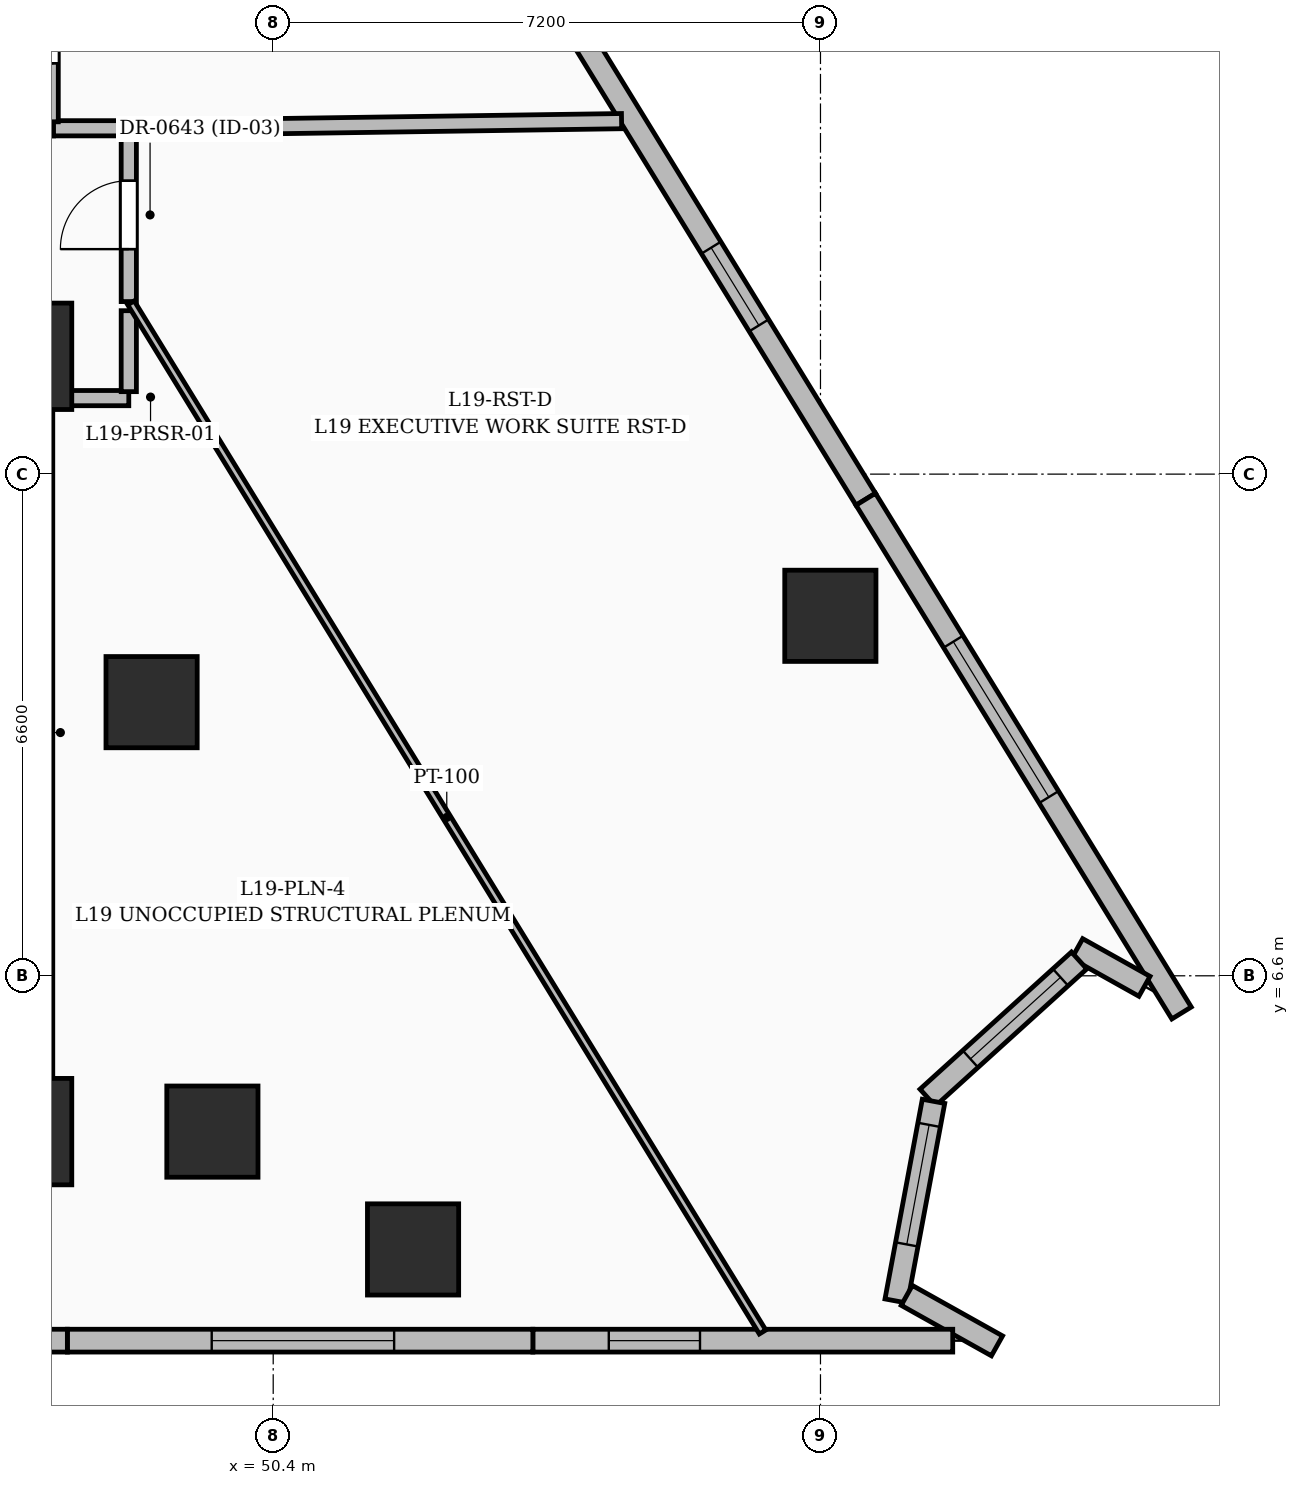
"""IFC4 building model, lengths in metres.
Left out: names, types, materials, properties, quantities, classifications, styles, units other than length and angle.
Written with IfcOpenShell. Run it as: python <this file> out.ifc"""

import sys

from ifc_helpers import new_model, si_unit, direction, frame, frame_2d, origin, origin_2d, place, context, subcontext, project, spatial, rectangle, extrude, element, fill, save


model = new_model("IFC4")
c1 = context("Model", 3, precision=1e-05, world=origin(), true_north=direction((0.0, 1.0)))
c2 = subcontext(c1, "Body", "Model", "MODEL_VIEW")
j1 = project(units=[si_unit("LENGTHUNIT", "METRE"), si_unit("PLANEANGLEUNIT", "RADIAN")], contexts=[c1])
p1 = place(None, origin())
s1 = spatial("IfcSite", under=j1, at=p1, CompositionType="ELEMENT")
p2 = place(p1, origin())
s2 = spatial("IfcBuilding", under=s1, at=p2, CompositionType="ELEMENT")
p3 = place(p2, frame((0.0, 0.0, 78.6)))
s3 = spatial("IfcBuildingStorey", under=s2, at=p3, CompositionType="ELEMENT", Elevation=78.6)
for number, where, z_axis, x_axis in (
    (1, (47.05, 4.55, 0.0), (0.0, 0.0, 1.0), (1.0, 0.0, 0.0)),
    (2, (47.05, 14.75, 0.0), (0.0, 0.0, 1.0), (1.0, 0.0, 0.0)),
):
    element("IfcColumn", number, at=place(p3, frame(where, z_axis=z_axis, x_axis=x_axis)), inside=s3, PredefinedType="COLUMN", context=c2, shape_type="SweptSolid", body=[
        extrude(rectangle(XDim=1.4, YDim=1.4, at=origin_2d()), origin(), (0.0, 0.0, 1.0), 3.6),
    ])
for number, where, z_axis, x_axis in (
    (3, (49.6, 4.55, 0.0), (0.0, 0.0, 1.0), (1.0, 0.0, 0.0)),
    (4, (48.8, 10.2, 0.0), (0.0, 0.0, 1.0), (1.0, 0.0, 0.0)),
    (5, (52.24, 3.0, 0.0), (0.0, 0.0, 1.0), (1.0, 0.0, 0.0)),
    (6, (57.73, 11.336, 0.0), (0.0, 0.0, 1.0), (1.0, 0.0, 0.0)),
):
    element("IfcColumn", number, at=place(p3, frame(where, z_axis=z_axis, x_axis=x_axis)), inside=s3, PredefinedType="COLUMN", context=c2, shape_type="SweptSolid", body=[
        extrude(rectangle(XDim=1.2, YDim=1.2, at=origin_2d()), origin(), (0.0, 0.0, 1.0), 3.6),
    ])
p4 = place(p3, frame((54.041, 19.629, 0.0), z_axis=(0.0, 0.0, 1.0), x_axis=(0.523661280051, -0.851926560083, 0.0)))
e7 = element("IfcWall", 7, at=p4, inside=s3, PredefinedType="SOLIDWALL", context=c2, shape_type="SweptSolid", body=[
    extrude(rectangle(XDim=7.934, YDim=0.3, at=frame_2d((3.967, 0.0))), origin(), (0.0, 0.0, 1.0), 3.35),
])
p5 = place(p4, frame((4.05, 0.0, 0.8)))
e8 = element("IfcOpeningElement", 8, at=p5, cuts=e7, PredefinedType="OPENING", context=c2, shape_type="SweptSolid", body=[
    extrude(rectangle(XDim=1.2, YDim=1.8, at=frame_2d((0.6, 0.9))), frame((0.0, 0.16, 0.0), z_axis=(0.0, -1.0, 0.0), x_axis=(1.0, 0.0, 0.0)), (0.0, 0.0, 1.0), 0.32),
])
p6 = place(p3, frame((58.195, 12.87, 0.0), z_axis=(0.0, 0.0, 1.0), x_axis=(0.52368361247, -0.851912832413, 0.0)))
e9 = element("IfcWall", 9, at=p6, inside=s3, PredefinedType="SOLIDWALL", context=c2, shape_type="SweptSolid", body=[
    extrude(rectangle(XDim=7.934, YDim=0.3, at=frame_2d((3.967, 0.0))), origin(), (0.0, 0.0, 1.0), 3.35),
])
p7 = place(p6, frame((2.2, 0.0, 0.6)))
e10 = element("IfcOpeningElement", 10, at=p7, cuts=e9, PredefinedType="OPENING", context=c2, shape_type="SweptSolid", body=[
    extrude(rectangle(XDim=2.4, YDim=2.1, at=frame_2d((1.2, 1.05))), frame((0.0, 0.16, 0.0), z_axis=(0.0, -1.0, 0.0), x_axis=(1.0, 0.0, 0.0)), (0.0, 0.0, 1.0), 0.32),
])
p8 = place(p3, frame((61.863, 6.462, 0.0), z_axis=(0.0, 0.0, 1.0), x_axis=(-0.872678236231, 0.488295705499, 0.0)))
e11 = element("IfcWall", 11, at=p8, inside=s3, PredefinedType="SOLIDWALL", context=c2, shape_type="SweptSolid", body=[
    extrude(rectangle(XDim=1.015, YDim=0.3, at=frame_2d((0.507, 0.0))), origin(), (0.0, 0.0, 1.0), 3.35),
])
p9 = place(p3, frame((61.003, 6.802, 0.0), z_axis=(0.0, 0.0, 1.0), x_axis=(-0.741163448221, -0.671324618215, 0.0)))
e12 = element("IfcWall", 12, at=p9, inside=s3, PredefinedType="SOLIDWALL", context=c2, shape_type="SweptSolid", body=[
    extrude(rectangle(XDim=2.688, YDim=0.3, at=frame_2d((1.344, 0.0))), origin(), (0.0, 0.0, 1.0), 3.35),
])
p10 = place(p9, frame((0.33, 0.0, 0.55)))
e13 = element("IfcOpeningElement", 13, at=p10, cuts=e12, PredefinedType="OPENING", context=c2, shape_type="SweptSolid", body=[
    extrude(rectangle(XDim=1.6, YDim=2.2, at=frame_2d((0.8, 1.1))), frame((0.0, 0.16, 0.0), z_axis=(0.0, -1.0, 0.0), x_axis=(1.0, 0.0, 0.0)), (0.0, 0.0, 1.0), 0.32),
])
p11 = place(p3, frame((59.087, 4.948, 0.0), z_axis=(0.0, 0.0, 1.0), x_axis=(-0.183786629236, -0.982966161632, 0.0)))
e14 = element("IfcWall", 14, at=p11, inside=s3, PredefinedType="SOLIDWALL", context=c2, shape_type="SweptSolid", body=[
    extrude(rectangle(XDim=2.673, YDim=0.3, at=frame_2d((1.336, 0.0))), origin(), (0.0, 0.0, 1.0), 3.35),
])
p12 = place(p11, frame((0.315, 0.0, 0.55)))
e15 = element("IfcOpeningElement", 15, at=p12, cuts=e14, PredefinedType="OPENING", context=c2, shape_type="SweptSolid", body=[
    extrude(rectangle(XDim=1.6, YDim=2.2, at=frame_2d((0.8, 1.1))), frame((0.0, 0.16, 0.0), z_axis=(0.0, -1.0, 0.0), x_axis=(1.0, 0.0, 0.0)), (0.0, 0.0, 1.0), 0.32),
])
p13 = place(p3, frame((58.735, 2.396, 0.0), z_axis=(0.0, 0.0, 1.0), x_axis=(0.872747775204, -0.488171405221, 0.0)))
e16 = element("IfcWall", 16, at=p13, inside=s3, PredefinedType="SOLIDWALL", context=c2, shape_type="SweptSolid", body=[
    extrude(rectangle(XDim=1.36, YDim=0.3, at=frame_2d((0.68, 0.0))), origin(), (0.0, 0.0, 1.0), 3.35),
])
p14 = place(p3, frame((59.34, 1.8, 0.0), z_axis=(0.0, 0.0, 1.0), x_axis=(-1.0, 0.0, 0.0)))
e17 = element("IfcWall", 17, at=p14, inside=s3, PredefinedType="SOLIDWALL", context=c2, shape_type="SweptSolid", body=[
    extrude(rectangle(XDim=5.524, YDim=0.3, at=frame_2d((2.762, 0.0))), origin(), (0.0, 0.0, 1.0), 3.35),
])
p15 = place(p14, frame((3.325, 0.0, 0.8)))
e18 = element("IfcOpeningElement", 18, at=p15, cuts=e17, PredefinedType="OPENING", context=c2, shape_type="SweptSolid", body=[
    extrude(rectangle(XDim=1.2, YDim=1.8, at=frame_2d((0.6, 0.9))), frame((0.0, 0.16, 0.0), z_axis=(0.0, -1.0, 0.0), x_axis=(1.0, 0.0, 0.0)), (0.0, 0.0, 1.0), 0.32),
])
p16 = place(p3, frame((53.816, 1.8, 0.0), z_axis=(0.0, 0.0, 1.0), x_axis=(-1.0, 0.0, 0.0)))
e19 = element("IfcWall", 19, at=p16, inside=s3, PredefinedType="SOLIDWALL", context=c2, shape_type="SweptSolid", body=[
    extrude(rectangle(XDim=6.124, YDim=0.3, at=frame_2d((3.062, 0.0))), origin(), (0.0, 0.0, 1.0), 3.35),
])
p17 = place(p16, frame((1.825, 0.0, 0.6)))
e20 = element("IfcOpeningElement", 20, at=p17, cuts=e19, PredefinedType="OPENING", context=c2, shape_type="SweptSolid", body=[
    extrude(rectangle(XDim=2.4, YDim=2.1, at=frame_2d((1.2, 1.05))), frame((0.0, 0.16, 0.0), z_axis=(0.0, -1.0, 0.0), x_axis=(1.0, 0.0, 0.0)), (0.0, 0.0, 1.0), 0.32),
])
p18 = place(p3, frame((47.692, 1.8, 0.0), z_axis=(0.0, 0.0, 1.0), x_axis=(-1.0, 0.0, 0.0)))
e21 = element("IfcWall", 21, at=p18, inside=s3, PredefinedType="SOLIDWALL", context=c2, shape_type="SweptSolid", body=[
    extrude(rectangle(XDim=6.124, YDim=0.3, at=frame_2d((3.062, 0.0))), origin(), (0.0, 0.0, 1.0), 3.35),
])
p19 = place(p18, frame((1.975, 0.0, 0.55)))
e22 = element("IfcOpeningElement", 22, at=p19, cuts=e21, PredefinedType="OPENING", context=c2, shape_type="SweptSolid", body=[
    extrude(rectangle(XDim=2.1, YDim=2.4, at=frame_2d((1.05, 1.2))), frame((0.0, 0.16, 0.0), z_axis=(0.0, -1.0, 0.0), x_axis=(1.0, 0.0, 0.0)), (0.0, 0.0, 1.0), 0.32),
])
p20 = place(p3, frame((47.5, 14.2, 0.0), z_axis=(0.0, 0.0, 1.0), x_axis=(1.0, 0.0, 0.0)))
e23 = element("IfcWall", 23, at=p20, inside=s3, PredefinedType="PARTITIONING", context=c2, shape_type="SweptSolid", body=[
    extrude(rectangle(XDim=1.0, YDim=0.2, at=frame_2d((0.5, 0.0))), origin(), (0.0, 0.0, 1.0), 3.35),
])
p21 = place(p3, frame((48.5, 14.285, 0.0), z_axis=(0.0, 0.0, 1.0), x_axis=(0.0, 1.0, 0.0)))
e24 = element("IfcWall", 24, at=p21, inside=s3, PredefinedType="PARTITIONING", context=c2, shape_type="SweptSolid", body=[
    extrude(rectangle(XDim=1.065, YDim=0.2, at=frame_2d((0.533, 0.0))), origin(), (0.0, 0.0, 1.0), 3.35),
])
p22 = place(p3, frame((48.5, 15.47, 0.0), z_axis=(0.0, 0.0, 1.0), x_axis=(0.0, 1.0, 0.0)))
e25 = element("IfcWall", 25, at=p22, inside=s3, PredefinedType="PARTITIONING", context=c2, shape_type="SweptSolid", body=[
    extrude(rectangle(XDim=2.28, YDim=0.2, at=frame_2d((1.14, 0.0))), origin(), (0.0, 0.0, 1.0), 2.345),
])
p23 = place(p22, frame((0.69, 0.0, 0.0)))
e26 = element("IfcOpeningElement", 26, at=p23, cuts=e25, PredefinedType="OPENING", context=c2, shape_type="SweptSolid", body=[
    extrude(rectangle(XDim=0.9, YDim=2.1, at=frame_2d((0.45, 1.05))), frame((0.0, 0.11, 0.0), z_axis=(0.0, -1.0, 0.0), x_axis=(1.0, 0.0, 0.0)), (0.0, 0.0, 1.0), 0.22),
])
p24 = place(p3, frame((47.51, 17.75, 0.0), z_axis=(0.0, 0.0, 1.0), x_axis=(-1.0, 0.0, 0.0)))
e27 = element("IfcWall", 27, at=p24, inside=s3, PredefinedType="PARTITIONING", context=c2, shape_type="SweptSolid", body=[
    extrude(rectangle(XDim=5.57, YDim=0.2, at=frame_2d((2.785, 0.0))), origin(), (0.0, 0.0, 1.0), 2.309),
])
p25 = place(p24, frame((3.0, 0.0, 0.0)))
e28 = element("IfcOpeningElement", 28, at=p25, cuts=e27, PredefinedType="OPENING", context=c2, shape_type="SweptSolid", body=[
    extrude(rectangle(XDim=1.0, YDim=2.2, at=frame_2d((0.5, 1.1))), frame((0.0, 0.11, 0.0), z_axis=(0.0, -1.0, 0.0), x_axis=(1.0, 0.0, 0.0)), (0.0, 0.0, 1.0), 0.22),
])
p26 = place(p3, frame((48.415, 17.75, 0.0), z_axis=(0.0, 0.0, 1.0), x_axis=(-1.0, 0.0, 0.0)))
e29 = element("IfcWall", 29, at=p26, inside=s3, PredefinedType="PARTITIONING", context=c2, shape_type="SweptSolid", body=[
    extrude(rectangle(XDim=0.905, YDim=0.2, at=frame_2d((0.453, 0.0))), origin(), (0.0, 0.0, 1.0), 3.01),
])
p27 = place(p3, frame((48.529, 15.453, 0.0), z_axis=(0.0, 0.0, 1.0), x_axis=(0.52306290803, -0.852294077325, 0.0)))
e30 = element("IfcWall", 30, at=p27, inside=s3, PredefinedType="PARTITIONING", context=c2, shape_type="SweptSolid", body=[
    extrude(rectangle(XDim=15.885, YDim=0.1, at=frame_2d((7.943, 0.0))), origin(), (0.0, 0.0, 1.0), 2.345),
])
p28 = place(p3, frame((54.983, 17.844, 0.0), z_axis=(0.0, 0.0, 1.0), x_axis=(-0.999894330503, -0.014537118977, 0.0)))
e31 = element("IfcWall", 31, at=p28, inside=s3, PredefinedType="PARTITIONING", context=c2, shape_type="SweptSolid", body=[
    extrude(rectangle(XDim=6.399, YDim=0.2, at=frame_2d((3.199, 0.0))), origin(), (0.0, 0.0, 1.0), 2.345),
])
p29 = place(p3, frame((47.51, 17.835, 0.0), z_axis=(0.0, 0.0, 1.0), x_axis=(0.0, 1.0, 0.0)))
e32 = element("IfcWall", 32, at=p29, inside=s3, PredefinedType="PARTITIONING", context=c2, shape_type="SweptSolid", body=[
    extrude(rectangle(XDim=2.695, YDim=0.125, at=frame_2d((1.348, 0.0))), origin(), (0.0, 0.0, 1.0), 3.01),
])
p30 = place(p29, frame((0.771, 0.0, 0.0)))
e33 = element("IfcOpeningElement", 33, at=p30, cuts=e32, PredefinedType="OPENING", context=c2, shape_type="SweptSolid", body=[
    extrude(rectangle(XDim=0.95, YDim=2.2, at=frame_2d((0.475, 1.1))), frame((0.0, 0.072, 0.0), z_axis=(0.0, -1.0, 0.0), x_axis=(1.0, 0.0, 0.0)), (0.0, 0.0, 1.0), 0.145),
])
p31 = place(p5, origin())
e34 = element("IfcWindow", 34, at=p31, inside=s3, PartitioningType="SINGLE_PANEL", PredefinedType="WINDOW", context=c2, shape_type="SweptSolid", body=[
    extrude(rectangle(XDim=1.2, YDim=1.8, at=frame_2d((0.6, 0.9))), frame((0.0, 0.03, 0.0), z_axis=(0.0, -1.0, 0.0), x_axis=(1.0, 0.0, 0.0)), (0.0, 0.0, 1.0), 0.06),
])
fill(e8, e34)
p32 = place(p7, origin())
e35 = element("IfcWindow", 35, at=p32, inside=s3, PartitioningType="SINGLE_PANEL", PredefinedType="WINDOW", context=c2, shape_type="SweptSolid", body=[
    extrude(rectangle(XDim=2.4, YDim=2.1, at=frame_2d((1.2, 1.05))), frame((0.0, 0.03, 0.0), z_axis=(0.0, -1.0, 0.0), x_axis=(1.0, 0.0, 0.0)), (0.0, 0.0, 1.0), 0.06),
])
fill(e10, e35)
p33 = place(p10, origin())
e36 = element("IfcWindow", 36, at=p33, inside=s3, PartitioningType="SINGLE_PANEL", PredefinedType="WINDOW", context=c2, shape_type="SweptSolid", body=[
    extrude(rectangle(XDim=1.6, YDim=2.2, at=frame_2d((0.8, 1.1))), frame((0.0, 0.03, 0.0), z_axis=(0.0, -1.0, 0.0), x_axis=(1.0, 0.0, 0.0)), (0.0, 0.0, 1.0), 0.06),
])
fill(e13, e36)
p34 = place(p12, origin())
e37 = element("IfcWindow", 37, at=p34, inside=s3, PartitioningType="SINGLE_PANEL", PredefinedType="WINDOW", context=c2, shape_type="SweptSolid", body=[
    extrude(rectangle(XDim=1.6, YDim=2.2, at=frame_2d((0.8, 1.1))), frame((0.0, 0.03, 0.0), z_axis=(0.0, -1.0, 0.0), x_axis=(1.0, 0.0, 0.0)), (0.0, 0.0, 1.0), 0.06),
])
fill(e15, e37)
p35 = place(p15, origin())
e38 = element("IfcWindow", 38, at=p35, inside=s3, PartitioningType="SINGLE_PANEL", PredefinedType="WINDOW", context=c2, shape_type="SweptSolid", body=[
    extrude(rectangle(XDim=1.2, YDim=1.8, at=frame_2d((0.6, 0.9))), frame((0.0, 0.03, 0.0), z_axis=(0.0, -1.0, 0.0), x_axis=(1.0, 0.0, 0.0)), (0.0, 0.0, 1.0), 0.06),
])
fill(e18, e38)
p36 = place(p17, origin())
e39 = element("IfcWindow", 39, at=p36, inside=s3, PartitioningType="SINGLE_PANEL", PredefinedType="WINDOW", context=c2, shape_type="SweptSolid", body=[
    extrude(rectangle(XDim=2.4, YDim=2.1, at=frame_2d((1.2, 1.05))), frame((0.0, 0.03, 0.0), z_axis=(0.0, -1.0, 0.0), x_axis=(1.0, 0.0, 0.0)), (0.0, 0.0, 1.0), 0.06),
])
fill(e20, e39)
p37 = place(p23, origin())
e40 = element("IfcDoor", 40, at=p37, inside=s3, OperationType="SINGLE_SWING_LEFT", PredefinedType="DOOR", context=c2, shape_type="SweptSolid", body=[
    extrude(rectangle(XDim=0.9, YDim=2.1, at=frame_2d((0.45, 1.05))), frame((0.0, 0.025, 0.0), z_axis=(0.0, -1.0, 0.0), x_axis=(1.0, 0.0, 0.0)), (0.0, 0.0, 1.0), 0.05),
])
fill(e26, e40)
p38 = place(p30, origin())
e41 = element("IfcDoor", 41, at=p38, inside=s3, OperationType="SINGLE_SWING_LEFT", PredefinedType="DOOR", context=c2, shape_type="SweptSolid", body=[
    extrude(rectangle(XDim=0.95, YDim=2.2, at=frame_2d((0.475, 1.1))), frame((0.0, 0.025, 0.0), z_axis=(0.0, -1.0, 0.0), x_axis=(1.0, 0.0, 0.0)), (0.0, 0.0, 1.0), 0.05),
])
fill(e33, e41)
save(model, sys.argv[1])
